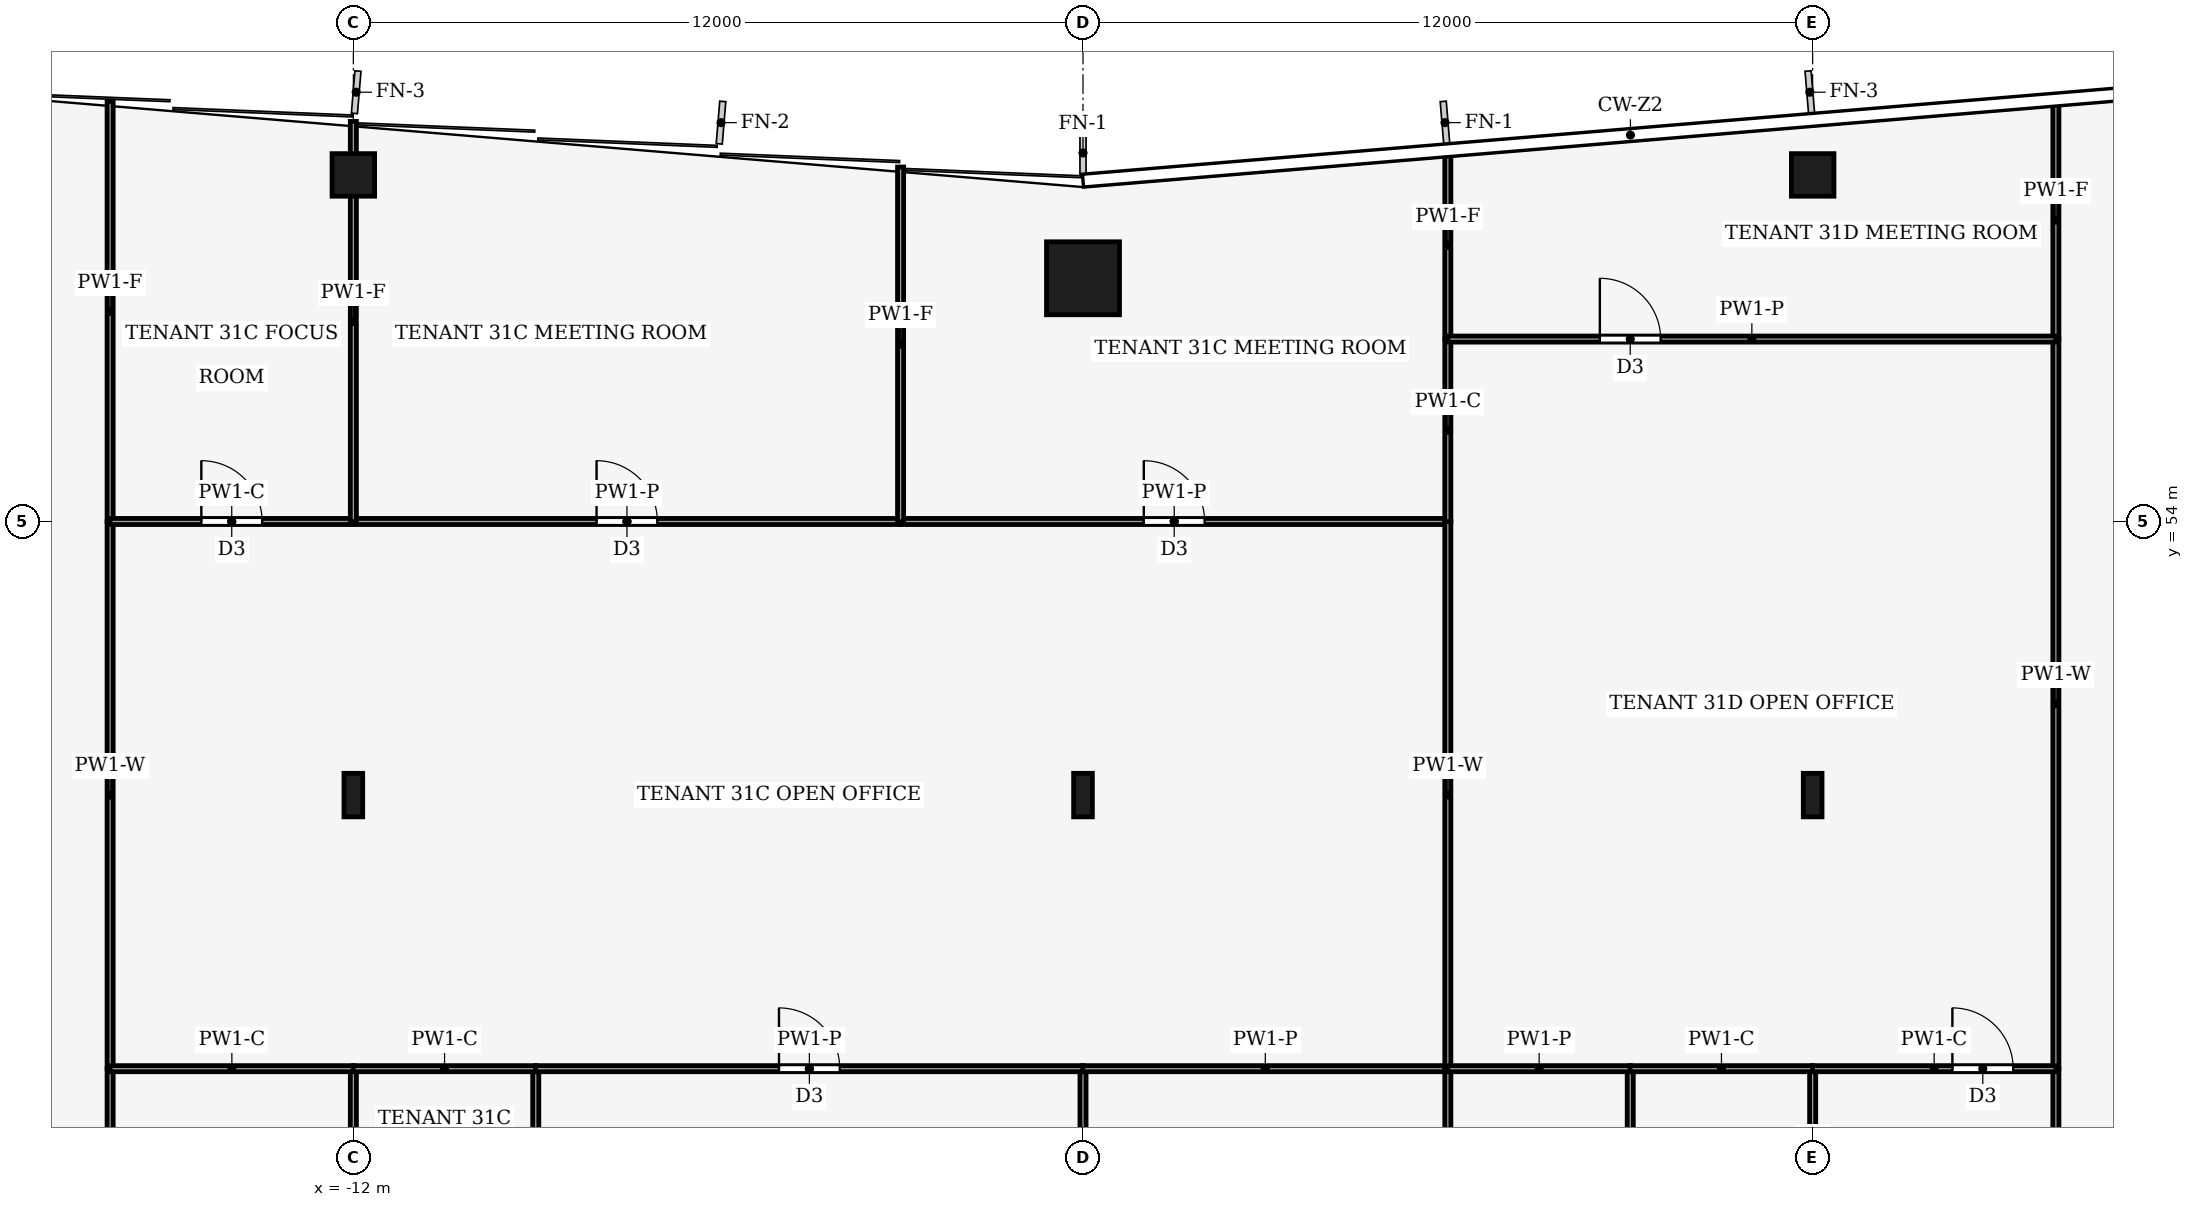
"""IFC4 building model, lengths in metres.
Left out: names, types, materials, properties, quantities, classifications, styles, units other than length and angle.
Written with IfcOpenShell. Run it as: python <this file> out.ifc"""

import sys

from ifc_helpers import new_model, si_unit, direction, frame, frame_2d, origin, origin_2d, place, context, subcontext, project, spatial, rectangle, hollow_rectangle, i_section, extrude, element, fill, save


model = new_model("IFC4")
c1 = context("Model", 3, precision=1e-05, world=origin(), true_north=direction((0.0, 1.0)))
c2 = subcontext(c1, "Body", "Model", "MODEL_VIEW")
j1 = project(units=[si_unit("LENGTHUNIT", "METRE"), si_unit("PLANEANGLEUNIT", "RADIAN")], contexts=[c1])
p1 = place(None, origin())
s1 = spatial("IfcSite", under=j1, at=p1, CompositionType="ELEMENT")
p2 = place(p1, origin())
s2 = spatial("IfcBuilding", under=s1, at=p2, CompositionType="ELEMENT")
p3 = place(p2, frame((0.0, 0.0, 138.0)))
s3 = spatial("IfcBuildingStorey", under=s2, at=p3, CompositionType="ELEMENT", Elevation=138.0)
p4 = place(p3, frame((0.0, 58.0, 0.0), z_axis=(0.0, 0.0, 1.0), x_axis=(1.0, 0.0, 0.0)))
e1 = element("IfcColumn", 1, at=p4, inside=s3, PredefinedType="COLUMN", context=c2, shape_type="SweptSolid", body=[
    extrude(hollow_rectangle(XDim=1.2, YDim=1.2, WallThickness=0.07, at=origin_2d()), origin(), (0.0, 0.0, 1.0), 4.0),
])
for number, where, z_axis, x_axis in (
    (2, (-12.0, 59.7, 0.0), (0.0, 0.0, 1.0), (1.0, 0.0, 0.0)),
    (3, (12.0, 59.7, 0.0), (0.0, 0.0, 1.0), (1.0, 0.0, 0.0)),
):
    element("IfcColumn", number, at=place(p3, frame(where, z_axis=z_axis, x_axis=x_axis)), inside=s3, PredefinedType="COLUMN", context=c2, shape_type="SweptSolid", body=[
        extrude(hollow_rectangle(XDim=0.7, YDim=0.7, WallThickness=0.03, at=origin_2d()), origin(), (0.0, 0.0, 1.0), 4.0),
    ])
for number, where, z_axis, x_axis in (
    (4, (-12.0, 49.5, 0.0), (0.0, 0.0, 1.0), (1.0, 0.0, 0.0)),
    (5, (0.0, 49.5, 0.0), (0.0, 0.0, 1.0), (1.0, 0.0, 0.0)),
    (6, (12.0, 49.5, 0.0), (0.0, 0.0, 1.0), (1.0, 0.0, 0.0)),
):
    element("IfcColumn", number, at=place(p3, frame(where, z_axis=z_axis, x_axis=x_axis)), inside=s3, PredefinedType="COLUMN", context=c2, shape_type="SweptSolid", body=[
        extrude(i_section(OverallWidth=0.308, OverallDepth=0.716, WebThickness=0.021, FlangeThickness=0.04, FilletRadius=0.027, at=origin_2d()), origin(), (0.0, 0.0, 1.0), 4.0),
    ])
p5 = place(p3, frame((-16.0, 41.0, 0.0), z_axis=(0.0, 0.0, 1.0), x_axis=(0.0, 1.0, 0.0)))
e7 = element("IfcWall", 7, at=p5, inside=s3, PredefinedType="PARTITIONING", context=c2, shape_type="SweptSolid", body=[
    extrude(rectangle(XDim=4.0, YDim=0.1, at=frame_2d((2.0, 0.0))), origin(), (0.0, 0.0, 1.0), 3.44),
])
p6 = place(p3, frame((-16.0, 45.0, 0.0), z_axis=(0.0, 0.0, 1.0), x_axis=(0.0, 1.0, 0.0)))
e8 = element("IfcWall", 8, at=p6, inside=s3, PredefinedType="PARTITIONING", context=c2, shape_type="SweptSolid", body=[
    extrude(rectangle(XDim=9.0, YDim=0.1, at=frame_2d((4.5, 0.0))), origin(), (0.0, 0.0, 1.0), 3.24),
])
p7 = place(p3, frame((-16.0, 54.0, 0.0), z_axis=(0.0, 0.0, 1.0), x_axis=(0.0, 1.0, 0.0)))
e9 = element("IfcWall", 9, at=p7, inside=s3, PredefinedType="PARTITIONING", context=c2, shape_type="SweptSolid", body=[
    extrude(rectangle(XDim=6.913, YDim=0.1, at=frame_2d((3.457, 0.0))), origin(), (0.0, 0.0, 1.0), 3.04),
])
p8 = place(p3, frame((16.0, 45.0, 0.0), z_axis=(0.0, 0.0, 1.0), x_axis=(0.0, -1.0, 0.0)))
e10 = element("IfcWall", 10, at=p8, inside=s3, PredefinedType="PARTITIONING", context=c2, shape_type="SweptSolid", body=[
    extrude(rectangle(XDim=4.0, YDim=0.1, at=frame_2d((2.0, 0.0))), origin(), (0.0, 0.0, 1.0), 3.44),
])
p9 = place(p3, frame((16.0, 57.0, 0.0), z_axis=(0.0, 0.0, 1.0), x_axis=(0.0, -1.0, 0.0)))
e11 = element("IfcWall", 11, at=p9, inside=s3, PredefinedType="PARTITIONING", context=c2, shape_type="SweptSolid", body=[
    extrude(rectangle(XDim=12.0, YDim=0.1, at=frame_2d((6.0, 0.0))), origin(), (0.0, 0.0, 1.0), 3.24),
])
p10 = place(p3, frame((16.0, 60.913, 0.0), z_axis=(0.0, 0.0, 1.0), x_axis=(0.0, -1.0, 0.0)))
e12 = element("IfcWall", 12, at=p10, inside=s3, PredefinedType="PARTITIONING", context=c2, shape_type="SweptSolid", body=[
    extrude(rectangle(XDim=3.913, YDim=0.1, at=frame_2d((1.957, 0.0))), origin(), (0.0, 0.0, 1.0), 3.04),
])
p11 = place(p3, frame((-12.0, 41.0, 0.0), z_axis=(0.0, 0.0, 1.0), x_axis=(0.0, 1.0, 0.0)))
e13 = element("IfcWall", 13, at=p11, inside=s3, PredefinedType="PARTITIONING", context=c2, shape_type="SweptSolid", body=[
    extrude(rectangle(XDim=4.0, YDim=0.1, at=frame_2d((2.0, 0.0))), origin(), (0.0, 0.0, 1.0), 3.44),
])
p12 = place(p3, frame((-11.996, 45.0, 0.0), z_axis=(0.0, 0.0, 1.0), x_axis=(-1.0, 0.0, 0.0)))
e14 = element("IfcWall", 14, at=p12, inside=s3, PredefinedType="PARTITIONING", context=c2, shape_type="SweptSolid", body=[
    extrude(rectangle(XDim=4.004, YDim=0.1, at=frame_2d((2.002, 0.0))), origin(), (0.0, 0.0, 1.0), 3.87),
])
p13 = place(p3, frame((-9.0, 41.0, 0.0), z_axis=(0.0, 0.0, 1.0), x_axis=(0.0, 1.0, 0.0)))
e15 = element("IfcWall", 15, at=p13, inside=s3, PredefinedType="PARTITIONING", context=c2, shape_type="SweptSolid", body=[
    extrude(rectangle(XDim=4.0, YDim=0.1, at=frame_2d((2.0, 0.0))), origin(), (0.0, 0.0, 1.0), 3.87),
])
p14 = place(p13, frame((1.5, 0.0, 0.0)))
e16 = element("IfcOpeningElement", 16, at=p14, cuts=e15, PredefinedType="OPENING", context=c2, shape_type="SweptSolid", body=[
    extrude(rectangle(XDim=1.0, YDim=2.1, at=frame_2d((0.5, 1.05))), frame((0.0, 0.06, 0.0), z_axis=(0.0, -1.0, 0.0), x_axis=(1.0, 0.0, 0.0)), (0.0, 0.0, 1.0), 0.12),
])
p15 = place(p3, frame((-8.996, 45.0, 0.0), z_axis=(0.0, 0.0, 1.0), x_axis=(-1.0, 0.0, 0.0)))
e17 = element("IfcWall", 17, at=p15, inside=s3, PredefinedType="PARTITIONING", context=c2, shape_type="SweptSolid", body=[
    extrude(rectangle(XDim=3.008, YDim=0.1, at=frame_2d((1.504, 0.0))), origin(), (0.0, 0.0, 1.0), 3.87),
])
p16 = place(p3, frame((0.0, 41.0, 0.0), z_axis=(0.0, 0.0, 1.0), x_axis=(0.0, 1.0, 0.0)))
e18 = element("IfcWall", 18, at=p16, inside=s3, PredefinedType="PARTITIONING", context=c2, shape_type="SweptSolid", body=[
    extrude(rectangle(XDim=4.0, YDim=0.1, at=frame_2d((2.0, 0.0))), origin(), (0.0, 0.0, 1.0), 3.44),
])
p17 = place(p3, frame((-9.004, 45.0, 0.0), z_axis=(0.0, 0.0, 1.0), x_axis=(1.0, 0.0, 0.0)))
e19 = element("IfcWall", 19, at=p17, inside=s3, PredefinedType="PARTITIONING", context=c2, shape_type="SweptSolid", body=[
    extrude(rectangle(XDim=9.008, YDim=0.1, at=frame_2d((4.504, 0.0))), origin(), (0.0, 0.0, 1.0), 3.44),
])
p18 = place(p17, frame((4.004, 0.0, 0.0)))
e20 = element("IfcOpeningElement", 20, at=p18, cuts=e19, PredefinedType="OPENING", context=c2, shape_type="SweptSolid", body=[
    extrude(rectangle(XDim=1.0, YDim=2.1, at=frame_2d((0.5, 1.05))), frame((0.0, 0.06, 0.0), z_axis=(0.0, -1.0, 0.0), x_axis=(1.0, 0.0, 0.0)), (0.0, 0.0, 1.0), 0.12),
])
p19 = place(p3, frame((6.0, 45.0, 0.0), z_axis=(0.0, 0.0, 1.0), x_axis=(-1.0, 0.0, 0.0)))
e21 = element("IfcWall", 21, at=p19, inside=s3, PredefinedType="PARTITIONING", context=c2, shape_type="SweptSolid", body=[
    extrude(rectangle(XDim=6.004, YDim=0.1, at=frame_2d((3.002, 0.0))), origin(), (0.0, 0.0, 1.0), 3.44),
])
p20 = place(p3, frame((6.0, 41.0, 0.0), z_axis=(0.0, 0.0, 1.0), x_axis=(0.0, 1.0, 0.0)))
e22 = element("IfcWall", 22, at=p20, inside=s3, PredefinedType="PARTITIONING", context=c2, shape_type="SweptSolid", body=[
    extrude(rectangle(XDim=4.0, YDim=0.1, at=frame_2d((2.0, 0.0))), origin(), (0.0, 0.0, 1.0), 3.87),
])
p21 = place(p3, frame((-16.0, 54.0, 0.0), z_axis=(0.0, 0.0, 1.0), x_axis=(1.0, 0.0, 0.0)))
e23 = element("IfcWall", 23, at=p21, inside=s3, PredefinedType="PARTITIONING", context=c2, shape_type="SweptSolid", body=[
    extrude(rectangle(XDim=4.0, YDim=0.1, at=frame_2d((2.0, 0.0))), origin(), (0.0, 0.0, 1.0), 3.87),
])
p22 = place(p21, frame((1.5, 0.0, 0.0)))
e24 = element("IfcOpeningElement", 24, at=p22, cuts=e23, PredefinedType="OPENING", context=c2, shape_type="SweptSolid", body=[
    extrude(rectangle(XDim=1.0, YDim=2.1, at=frame_2d((0.5, 1.05))), frame((0.0, 0.06, 0.0), z_axis=(0.0, -1.0, 0.0), x_axis=(1.0, 0.0, 0.0)), (0.0, 0.0, 1.0), 0.12),
])
p23 = place(p3, frame((-12.0, 54.0, 0.0), z_axis=(0.0, 0.0, 1.0), x_axis=(1.0, 0.0, 0.0)))
e25 = element("IfcWall", 25, at=p23, inside=s3, PredefinedType="PARTITIONING", context=c2, shape_type="SweptSolid", body=[
    extrude(rectangle(XDim=9.0, YDim=0.1, at=frame_2d((4.5, 0.0))), origin(), (0.0, 0.0, 1.0), 3.44),
])
p24 = place(p23, frame((4.0, 0.0, 0.0)))
e26 = element("IfcOpeningElement", 26, at=p24, cuts=e25, PredefinedType="OPENING", context=c2, shape_type="SweptSolid", body=[
    extrude(rectangle(XDim=1.0, YDim=2.1, at=frame_2d((0.5, 1.05))), frame((0.0, 0.06, 0.0), z_axis=(0.0, -1.0, 0.0), x_axis=(1.0, 0.0, 0.0)), (0.0, 0.0, 1.0), 0.12),
])
p25 = place(p3, frame((-3.0, 54.0, 0.0), z_axis=(0.0, 0.0, 1.0), x_axis=(1.0, 0.0, 0.0)))
e27 = element("IfcWall", 27, at=p25, inside=s3, PredefinedType="PARTITIONING", context=c2, shape_type="SweptSolid", body=[
    extrude(rectangle(XDim=9.0, YDim=0.1, at=frame_2d((4.5, 0.0))), origin(), (0.0, 0.0, 1.0), 3.44),
])
p26 = place(p25, frame((4.0, 0.0, 0.0)))
e28 = element("IfcOpeningElement", 28, at=p26, cuts=e27, PredefinedType="OPENING", context=c2, shape_type="SweptSolid", body=[
    extrude(rectangle(XDim=1.0, YDim=2.1, at=frame_2d((0.5, 1.05))), frame((0.0, 0.06, 0.0), z_axis=(0.0, -1.0, 0.0), x_axis=(1.0, 0.0, 0.0)), (0.0, 0.0, 1.0), 0.12),
])
p27 = place(p3, frame((6.0, 45.0, 0.0), z_axis=(0.0, 0.0, 1.0), x_axis=(0.0, 1.0, 0.0)))
e29 = element("IfcWall", 29, at=p27, inside=s3, PredefinedType="PARTITIONING", context=c2, shape_type="SweptSolid", body=[
    extrude(rectangle(XDim=9.004, YDim=0.1, at=frame_2d((4.502, 0.0))), origin(), (0.0, 0.0, 1.0), 3.24),
])
p28 = place(p3, frame((-12.0, 54.0, 0.0), z_axis=(0.0, 0.0, 1.0), x_axis=(0.0, 1.0, 0.0)))
e30 = element("IfcWall", 30, at=p28, inside=s3, PredefinedType="PARTITIONING", context=c2, shape_type="SweptSolid", body=[
    extrude(rectangle(XDim=6.58, YDim=0.1, at=frame_2d((3.29, 0.0))), origin(), (0.0, 0.0, 1.0), 3.04),
])
p29 = place(p3, frame((-3.0, 54.0, 0.0), z_axis=(0.0, 0.0, 1.0), x_axis=(0.0, 1.0, 0.0)))
e31 = element("IfcWall", 31, at=p29, inside=s3, PredefinedType="PARTITIONING", context=c2, shape_type="SweptSolid", body=[
    extrude(rectangle(XDim=5.83, YDim=0.1, at=frame_2d((2.915, 0.0))), origin(), (0.0, 0.0, 1.0), 3.04),
])
p30 = place(p3, frame((6.0, 53.996, 0.0), z_axis=(0.0, 0.0, 1.0), x_axis=(0.0, 1.0, 0.0)))
e32 = element("IfcWall", 32, at=p30, inside=s3, PredefinedType="PARTITIONING", context=c2, shape_type="SweptSolid", body=[
    extrude(rectangle(XDim=3.004, YDim=0.1, at=frame_2d((1.502, 0.0))), origin(), (0.0, 0.0, 1.0), 3.87),
])
p31 = place(p3, frame((6.0, 57.0, 0.0), z_axis=(0.0, 0.0, 1.0), x_axis=(0.0, 1.0, 0.0)))
e33 = element("IfcWall", 33, at=p31, inside=s3, PredefinedType="PARTITIONING", context=c2, shape_type="SweptSolid", body=[
    extrude(rectangle(XDim=3.08, YDim=0.1, at=frame_2d((1.54, 0.0))), origin(), (0.0, 0.0, 1.0), 3.04),
])
p32 = place(p3, frame((9.0, 41.0, 0.0), z_axis=(0.0, 0.0, 1.0), x_axis=(0.0, 1.0, 0.0)))
e34 = element("IfcWall", 34, at=p32, inside=s3, PredefinedType="PARTITIONING", context=c2, shape_type="SweptSolid", body=[
    extrude(rectangle(XDim=4.0, YDim=0.1, at=frame_2d((2.0, 0.0))), origin(), (0.0, 0.0, 1.0), 3.87),
])
p33 = place(p3, frame((9.004, 45.0, 0.0), z_axis=(0.0, 0.0, 1.0), x_axis=(-1.0, 0.0, 0.0)))
e35 = element("IfcWall", 35, at=p33, inside=s3, PredefinedType="PARTITIONING", context=c2, shape_type="SweptSolid", body=[
    extrude(rectangle(XDim=3.004, YDim=0.1, at=frame_2d((1.502, 0.0))), origin(), (0.0, 0.0, 1.0), 3.44),
])
p34 = place(p3, frame((12.0, 41.0, 0.0), z_axis=(0.0, 0.0, 1.0), x_axis=(0.0, 1.0, 0.0)))
e36 = element("IfcWall", 36, at=p34, inside=s3, PredefinedType="PARTITIONING", context=c2, shape_type="SweptSolid", body=[
    extrude(rectangle(XDim=4.0, YDim=0.1, at=frame_2d((2.0, 0.0))), origin(), (0.0, 0.0, 1.0), 3.44),
])
p35 = place(p34, frame((1.9, 0.0, 0.0)))
e37 = element("IfcOpeningElement", 37, at=p35, cuts=e36, PredefinedType="OPENING", context=c2, shape_type="SweptSolid", body=[
    extrude(rectangle(XDim=1.0, YDim=2.1, at=frame_2d((0.5, 1.05))), frame((0.0, 0.06, 0.0), z_axis=(0.0, -1.0, 0.0), x_axis=(1.0, 0.0, 0.0)), (0.0, 0.0, 1.0), 0.12),
])
p36 = place(p3, frame((12.004, 45.0, 0.0), z_axis=(0.0, 0.0, 1.0), x_axis=(-1.0, 0.0, 0.0)))
e38 = element("IfcWall", 38, at=p36, inside=s3, PredefinedType="PARTITIONING", context=c2, shape_type="SweptSolid", body=[
    extrude(rectangle(XDim=3.008, YDim=0.1, at=frame_2d((1.504, 0.0))), origin(), (0.0, 0.0, 1.0), 3.87),
])
p37 = place(p3, frame((11.996, 45.0, 0.0), z_axis=(0.0, 0.0, 1.0), x_axis=(1.0, 0.0, 0.0)))
e39 = element("IfcWall", 39, at=p37, inside=s3, PredefinedType="PARTITIONING", context=c2, shape_type="SweptSolid", body=[
    extrude(rectangle(XDim=4.004, YDim=0.1, at=frame_2d((2.002, 0.0))), origin(), (0.0, 0.0, 1.0), 3.87),
])
p38 = place(p37, frame((2.302, 0.0, 0.0)))
e40 = element("IfcOpeningElement", 40, at=p38, cuts=e39, PredefinedType="OPENING", context=c2, shape_type="SweptSolid", body=[
    extrude(rectangle(XDim=1.0, YDim=2.1, at=frame_2d((0.5, 1.05))), frame((0.0, 0.06, 0.0), z_axis=(0.0, -1.0, 0.0), x_axis=(1.0, 0.0, 0.0)), (0.0, 0.0, 1.0), 0.12),
])
p39 = place(p3, frame((6.0, 57.0, 0.0), z_axis=(0.0, 0.0, 1.0), x_axis=(1.0, 0.0, 0.0)))
e41 = element("IfcWall", 41, at=p39, inside=s3, PredefinedType="PARTITIONING", context=c2, shape_type="SweptSolid", body=[
    extrude(rectangle(XDim=10.0, YDim=0.1, at=frame_2d((5.0, 0.0))), origin(), (0.0, 0.0, 1.0), 3.44),
])
p40 = place(p39, frame((2.5, 0.0, 0.0)))
e42 = element("IfcOpeningElement", 42, at=p40, cuts=e41, PredefinedType="OPENING", context=c2, shape_type="SweptSolid", body=[
    extrude(rectangle(XDim=1.0, YDim=2.1, at=frame_2d((0.5, 1.05))), frame((0.0, 0.06, 0.0), z_axis=(0.0, -1.0, 0.0), x_axis=(1.0, 0.0, 0.0)), (0.0, 0.0, 1.0), 0.12),
])
p41 = place(p18, origin())
e43 = element("IfcDoor", 43, at=p41, inside=s3, OperationType="SINGLE_SWING_LEFT", PredefinedType="DOOR", context=c2, shape_type="SweptSolid", body=[
    extrude(rectangle(XDim=1.0, YDim=2.1, at=frame_2d((0.5, 1.05))), frame((0.0, 0.025, 0.0), z_axis=(0.0, -1.0, 0.0), x_axis=(1.0, 0.0, 0.0)), (0.0, 0.0, 1.0), 0.05),
])
fill(e20, e43)
p42 = place(p22, origin())
e44 = element("IfcDoor", 44, at=p42, inside=s3, OperationType="SINGLE_SWING_RIGHT", PredefinedType="DOOR", context=c2, shape_type="SweptSolid", body=[
    extrude(rectangle(XDim=1.0, YDim=2.1, at=frame_2d((0.5, 1.05))), frame((0.0, 0.025, 0.0), z_axis=(0.0, -1.0, 0.0), x_axis=(1.0, 0.0, 0.0)), (0.0, 0.0, 1.0), 0.05),
])
fill(e24, e44)
p43 = place(p24, origin())
e45 = element("IfcDoor", 45, at=p43, inside=s3, OperationType="SINGLE_SWING_LEFT", PredefinedType="DOOR", context=c2, shape_type="SweptSolid", body=[
    extrude(rectangle(XDim=1.0, YDim=2.1, at=frame_2d((0.5, 1.05))), frame((0.0, 0.025, 0.0), z_axis=(0.0, -1.0, 0.0), x_axis=(1.0, 0.0, 0.0)), (0.0, 0.0, 1.0), 0.05),
])
fill(e26, e45)
p44 = place(p26, origin())
e46 = element("IfcDoor", 46, at=p44, inside=s3, OperationType="SINGLE_SWING_RIGHT", PredefinedType="DOOR", context=c2, shape_type="SweptSolid", body=[
    extrude(rectangle(XDim=1.0, YDim=2.1, at=frame_2d((0.5, 1.05))), frame((0.0, 0.025, 0.0), z_axis=(0.0, -1.0, 0.0), x_axis=(1.0, 0.0, 0.0)), (0.0, 0.0, 1.0), 0.05),
])
fill(e28, e46)
p45 = place(p38, origin())
e47 = element("IfcDoor", 47, at=p45, inside=s3, OperationType="SINGLE_SWING_RIGHT", PredefinedType="DOOR", context=c2, shape_type="SweptSolid", body=[
    extrude(rectangle(XDim=1.0, YDim=2.1, at=frame_2d((0.5, 1.05))), frame((0.0, 0.025, 0.0), z_axis=(0.0, -1.0, 0.0), x_axis=(1.0, 0.0, 0.0)), (0.0, 0.0, 1.0), 0.05),
])
fill(e40, e47)
p46 = place(p40, origin())
e48 = element("IfcDoor", 48, at=p46, inside=s3, OperationType="SINGLE_SWING_LEFT", PredefinedType="DOOR", context=c2, shape_type="SweptSolid", body=[
    extrude(rectangle(XDim=1.0, YDim=2.1, at=frame_2d((0.5, 1.05))), frame((0.0, 0.025, 0.0), z_axis=(0.0, -1.0, 0.0), x_axis=(1.0, 0.0, 0.0)), (0.0, 0.0, 1.0), 0.05),
])
fill(e42, e48)
save(model, sys.argv[1])
